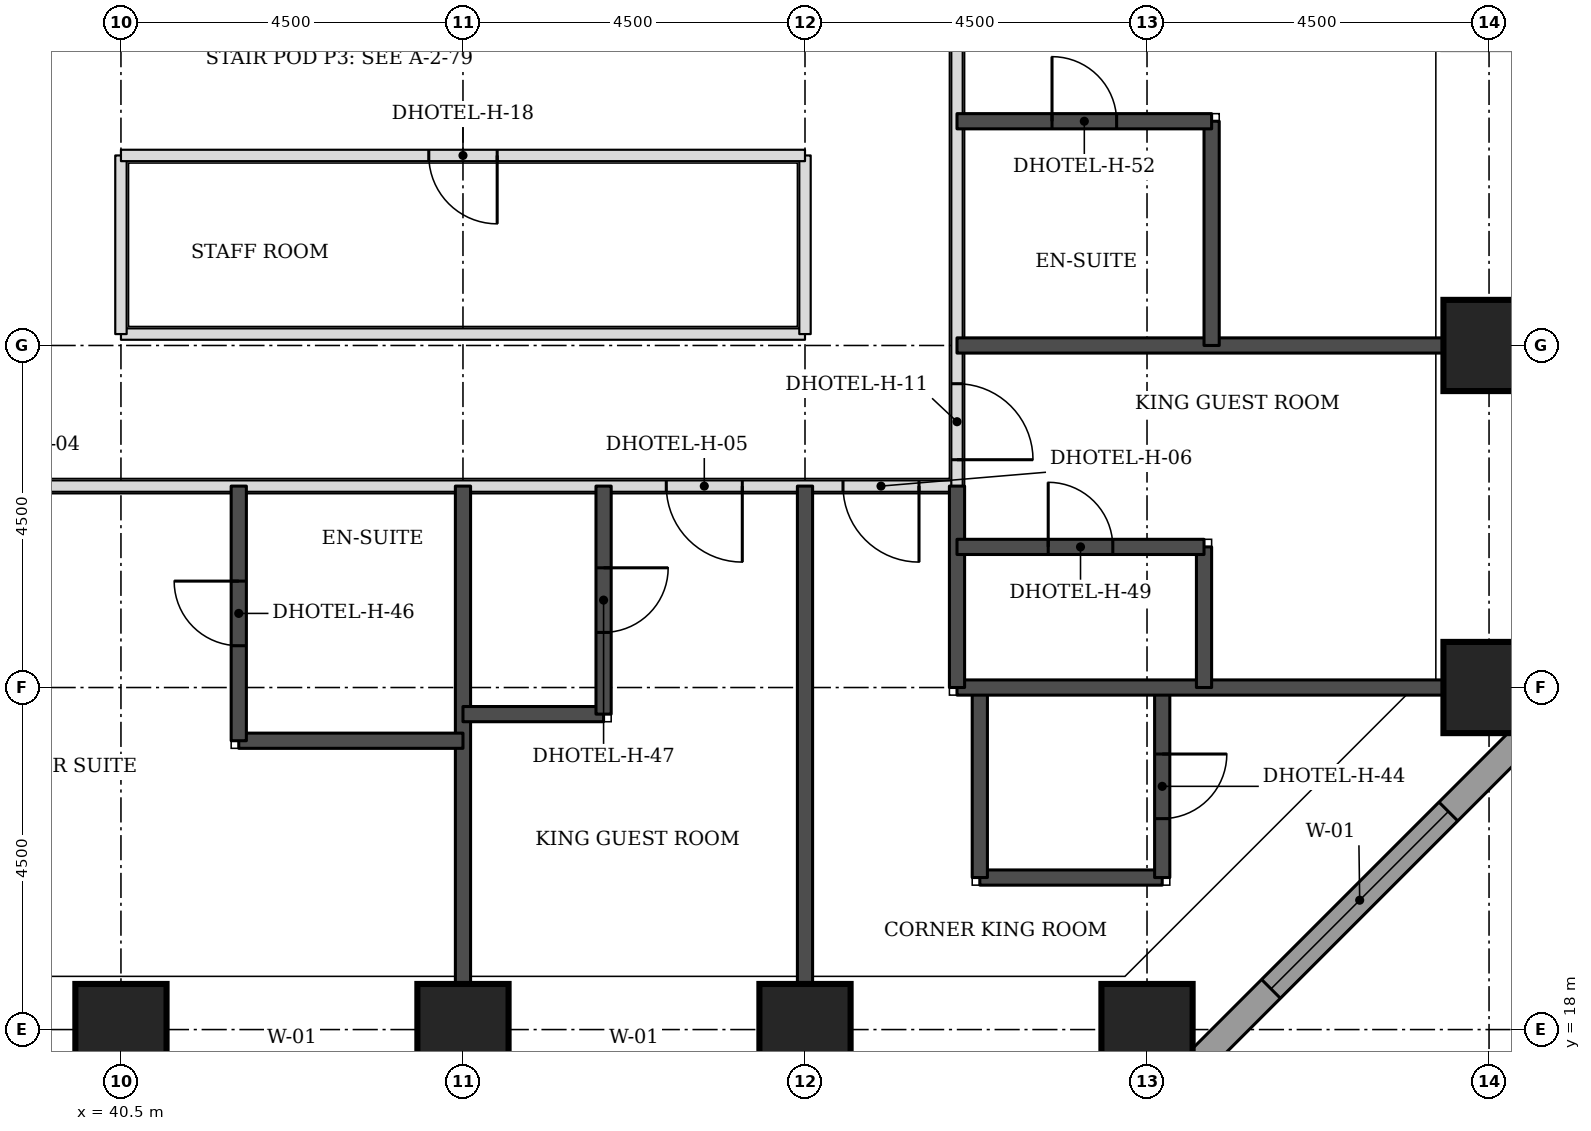
"""IFC4 building model, lengths in metres.
Left out: names, types, materials, properties, quantities, classifications, styles, units other than length and angle.
Written with IfcOpenShell. Run it as: python <this file> out.ifc"""

import sys

from ifc_helpers import new_model, si_unit, direction, frame, frame_2d, origin, origin_2d, place, context, subcontext, project, spatial, rectangle, extrude, element, fill, save


model = new_model("IFC4")
c1 = context("Model", 3, precision=1e-05, world=origin(), true_north=direction((0.0, 1.0)))
c2 = subcontext(c1, "Body", "Model", "MODEL_VIEW")
j1 = project(units=[si_unit("LENGTHUNIT", "METRE"), si_unit("PLANEANGLEUNIT", "RADIAN")], contexts=[c1])
p1 = place(None, origin())
s1 = spatial("IfcSite", under=j1, at=p1, CompositionType="ELEMENT")
p2 = place(p1, origin())
s2 = spatial("IfcBuilding", under=s1, at=p2, CompositionType="ELEMENT")
p3 = place(p2, frame((0.0, 0.0, 46.2)))
s3 = spatial("IfcBuildingStorey", under=s2, at=p3, CompositionType="ELEMENT", Elevation=46.2)
for number, where, z_axis, x_axis in (
    (1, (40.5, 18.0, 0.0), (0.0, 0.0, 1.0), (1.0, 0.0, 0.0)),
    (2, (45.0, 18.0, 0.0), (0.0, 0.0, 1.0), (1.0, 0.0, 0.0)),
    (3, (49.5, 18.0, 0.0), (0.0, 0.0, 1.0), (1.0, 0.0, 0.0)),
    (4, (54.0, 18.0, 0.0), (0.0, 0.0, 1.0), (1.0, 0.0, 0.0)),
    (5, (58.5, 22.5, 0.0), (0.0, 0.0, 1.0), (1.0, 0.0, 0.0)),
    (6, (58.5, 27.0, 0.0), (0.0, 0.0, 1.0), (1.0, 0.0, 0.0)),
):
    element("IfcColumn", number, at=place(p3, frame(where, z_axis=z_axis, x_axis=x_axis)), inside=s3, PredefinedType="COLUMN", context=c2, shape_type="SweptSolid", body=[
        extrude(rectangle(XDim=1.2, YDim=1.2, at=origin_2d()), origin(), (0.0, 0.0, 1.0), 3.3),
    ])
p4 = place(p3, frame((54.27, 17.174, 0.0), z_axis=(0.0, 0.0, 1.0), x_axis=(0.707106781187, 0.707106781187, 0.0)))
e7 = element("IfcWall", 7, at=p4, inside=s3, PredefinedType="STANDARD", context=c2, shape_type="SweptSolid", body=[
    extrude(rectangle(XDim=7.151, YDim=0.35, at=frame_2d((3.576, 0.0))), origin(), (0.0, 0.0, 1.0), 3.055),
])
p5 = place(p4, frame((1.926, 0.0, 0.8)))
e8 = element("IfcOpeningElement", 8, at=p5, cuts=e7, PredefinedType="OPENING", context=c2, shape_type="SweptSolid", body=[
    extrude(rectangle(XDim=3.3, YDim=1.5, at=frame_2d((1.65, 0.75))), frame((0.0, 0.185, 0.0), z_axis=(0.0, -1.0, 0.0), x_axis=(1.0, 0.0, 0.0)), (0.0, 0.0, 1.0), 0.37),
])
p6 = place(p3, frame((20.65, 25.15, 0.0), z_axis=(0.0, 0.0, 1.0), x_axis=(1.0, 0.0, 0.0)))
e9 = element("IfcWall", 9, at=p6, inside=s3, PredefinedType="PARTITIONING", context=c2, shape_type="SweptSolid", body=[
    extrude(rectangle(XDim=30.85, YDim=0.15, at=frame_2d((15.425, 0.0))), origin(), (0.0, 0.0, 1.0), 3.08),
])
p7 = place(p6, frame((2.425, 0.0, 0.0)))
e10 = element("IfcOpeningElement", 10, at=p7, cuts=e9, PredefinedType="OPENING", context=c2, shape_type="SweptSolid", body=[
    extrude(rectangle(XDim=1.0, YDim=2.1, at=frame_2d((0.5, 1.05))), frame((0.0, 0.085, 0.0), z_axis=(0.0, -1.0, 0.0), x_axis=(1.0, 0.0, 0.0)), (0.0, 0.0, 1.0), 0.17),
])
p8 = place(p6, frame((11.575, 0.0, 0.0)))
e11 = element("IfcOpeningElement", 11, at=p8, cuts=e9, PredefinedType="OPENING", context=c2, shape_type="SweptSolid", body=[
    extrude(rectangle(XDim=1.0, YDim=2.1, at=frame_2d((0.5, 1.05))), frame((0.0, 0.085, 0.0), z_axis=(0.0, -1.0, 0.0), x_axis=(1.0, 0.0, 0.0)), (0.0, 0.0, 1.0), 0.17),
])
p9 = place(p6, frame((17.875, 0.0, 0.0)))
e12 = element("IfcOpeningElement", 12, at=p9, cuts=e9, PredefinedType="OPENING", context=c2, shape_type="SweptSolid", body=[
    extrude(rectangle(XDim=1.0, YDim=2.1, at=frame_2d((0.5, 1.05))), frame((0.0, 0.085, 0.0), z_axis=(0.0, -1.0, 0.0), x_axis=(1.0, 0.0, 0.0)), (0.0, 0.0, 1.0), 0.17),
])
p10 = place(p6, frame((27.025, 0.0, 0.0)))
e13 = element("IfcOpeningElement", 13, at=p10, cuts=e9, PredefinedType="OPENING", context=c2, shape_type="SweptSolid", body=[
    extrude(rectangle(XDim=1.0, YDim=2.1, at=frame_2d((0.5, 1.05))), frame((0.0, 0.085, 0.0), z_axis=(0.0, -1.0, 0.0), x_axis=(1.0, 0.0, 0.0)), (0.0, 0.0, 1.0), 0.17),
])
p11 = place(p6, frame((0.425, 0.0, 0.0)))
e14 = element("IfcOpeningElement", 14, at=p11, cuts=e9, PredefinedType="OPENING", context=c2, shape_type="SweptSolid", body=[
    extrude(rectangle(XDim=1.0, YDim=2.1, at=frame_2d((0.5, 1.05))), frame((0.0, 0.085, 0.0), z_axis=(0.0, -1.0, 0.0), x_axis=(1.0, 0.0, 0.0)), (0.0, 0.0, 1.0), 0.17),
])
p12 = place(p6, frame((29.35, 0.0, 0.0)))
e15 = element("IfcOpeningElement", 15, at=p12, cuts=e9, PredefinedType="OPENING", context=c2, shape_type="SweptSolid", body=[
    extrude(rectangle(XDim=1.0, YDim=2.1, at=frame_2d((0.5, 1.05))), frame((0.0, 0.085, 0.0), z_axis=(0.0, -1.0, 0.0), x_axis=(1.0, 0.0, 0.0)), (0.0, 0.0, 1.0), 0.17),
])
p13 = place(p3, frame((51.5, 25.15, 0.0), z_axis=(0.0, 0.0, 1.0), x_axis=(0.0, 1.0, 0.0)))
e16 = element("IfcWall", 16, at=p13, inside=s3, PredefinedType="PARTITIONING", context=c2, shape_type="SweptSolid", body=[
    extrude(rectangle(XDim=22.35, YDim=0.15, at=frame_2d((11.175, 0.0))), origin(), (0.0, 0.0, 1.0), 3.08),
])
p14 = place(p13, frame((0.347, 0.0, 0.0)))
e17 = element("IfcOpeningElement", 17, at=p14, cuts=e16, PredefinedType="OPENING", context=c2, shape_type="SweptSolid", body=[
    extrude(rectangle(XDim=1.0, YDim=2.1, at=frame_2d((0.5, 1.05))), frame((0.0, 0.085, 0.0), z_axis=(0.0, -1.0, 0.0), x_axis=(1.0, 0.0, 0.0)), (0.0, 0.0, 1.0), 0.17),
])
p15 = place(p13, frame((7.325, 0.0, 0.0)))
e18 = element("IfcOpeningElement", 18, at=p15, cuts=e16, PredefinedType="OPENING", context=c2, shape_type="SweptSolid", body=[
    extrude(rectangle(XDim=1.0, YDim=2.1, at=frame_2d((0.5, 1.05))), frame((0.0, 0.085, 0.0), z_axis=(0.0, -1.0, 0.0), x_axis=(1.0, 0.0, 0.0)), (0.0, 0.0, 1.0), 0.17),
])
p16 = place(p13, frame((11.675, 0.0, 0.0)))
e19 = element("IfcOpeningElement", 19, at=p16, cuts=e16, PredefinedType="OPENING", context=c2, shape_type="SweptSolid", body=[
    extrude(rectangle(XDim=1.0, YDim=2.1, at=frame_2d((0.5, 1.05))), frame((0.0, 0.085, 0.0), z_axis=(0.0, -1.0, 0.0), x_axis=(1.0, 0.0, 0.0)), (0.0, 0.0, 1.0), 0.17),
])
p17 = place(p3, frame((40.5, 27.15, 0.0), z_axis=(0.0, 0.0, 1.0), x_axis=(1.0, 0.0, 0.0)))
e20 = element("IfcWall", 20, at=p17, inside=s3, PredefinedType="PARTITIONING", context=c2, shape_type="SweptSolid", body=[
    extrude(rectangle(XDim=9.0, YDim=0.15, at=frame_2d((4.5, 0.0))), origin(), (0.0, 0.0, 1.0), 3.08),
])
for number, where, z_axis, x_axis in (
    (21, (40.5, 27.15, 0.0), (0.0, 0.0, 1.0), (0.0, 1.0, 0.0)),
    (22, (49.5, 27.15, 0.0), (0.0, 0.0, 1.0), (0.0, 1.0, 0.0)),
):
    element("IfcWall", number, at=place(p3, frame(where, z_axis=z_axis, x_axis=x_axis)), inside=s3, PredefinedType="PARTITIONING", context=c2, shape_type="SweptSolid", body=[
        extrude(rectangle(XDim=2.35, YDim=0.15, at=frame_2d((1.175, 0.0))), origin(), (0.0, 0.0, 1.0), 3.08),
    ])
p18 = place(p3, frame((40.5, 29.5, 0.0), z_axis=(0.0, 0.0, 1.0), x_axis=(1.0, 0.0, 0.0)))
e23 = element("IfcWall", 23, at=p18, inside=s3, PredefinedType="PARTITIONING", context=c2, shape_type="SweptSolid", body=[
    extrude(rectangle(XDim=9.0, YDim=0.15, at=frame_2d((4.5, 0.0))), origin(), (0.0, 0.0, 1.0), 3.08),
])
p19 = place(p18, frame((4.05, 0.0, 0.0)))
e24 = element("IfcOpeningElement", 24, at=p19, cuts=e23, PredefinedType="OPENING", context=c2, shape_type="SweptSolid", body=[
    extrude(rectangle(XDim=0.9, YDim=2.1, at=frame_2d((0.45, 1.05))), frame((0.0, 0.085, 0.0), z_axis=(0.0, -1.0, 0.0), x_axis=(1.0, 0.0, 0.0)), (0.0, 0.0, 1.0), 0.17),
])
for number, where, z_axis, x_axis in (
    (25, (45.0, 18.6, 0.0), (0.0, 0.0, 1.0), (0.0, 1.0, 0.0)),
    (26, (49.5, 18.6, 0.0), (0.0, 0.0, 1.0), (0.0, 1.0, 0.0)),
):
    element("IfcWall", number, at=place(p3, frame(where, z_axis=z_axis, x_axis=x_axis)), inside=s3, PredefinedType="SOLIDWALL", context=c2, shape_type="SweptSolid", body=[
        extrude(rectangle(XDim=6.55, YDim=0.2, at=frame_2d((3.275, 0.0))), origin(), (0.0, 0.0, 1.0), 3.08),
    ])
p20 = place(p3, frame((51.8, 20.0, 0.0), z_axis=(0.0, 0.0, 1.0), x_axis=(1.0, 0.0, 0.0)))
e27 = element("IfcWall", 27, at=p20, inside=s3, PredefinedType="SOLIDWALL", context=c2, shape_type="SweptSolid", body=[
    extrude(rectangle(XDim=2.4, YDim=0.2, at=frame_2d((1.2, 0.0))), origin(), (0.0, 0.0, 1.0), 3.08),
])
p21 = place(p3, frame((51.8, 20.0, 0.0), z_axis=(0.0, 0.0, 1.0), x_axis=(0.0, 1.0, 0.0)))
e28 = element("IfcWall", 28, at=p21, inside=s3, PredefinedType="SOLIDWALL", context=c2, shape_type="SweptSolid", body=[
    extrude(rectangle(XDim=2.5, YDim=0.2, at=frame_2d((1.25, 0.0))), origin(), (0.0, 0.0, 1.0), 3.08),
])
p22 = place(p3, frame((54.2, 20.0, 0.0), z_axis=(0.0, 0.0, 1.0), x_axis=(0.0, 1.0, 0.0)))
e29 = element("IfcWall", 29, at=p22, inside=s3, PredefinedType="SOLIDWALL", context=c2, shape_type="SweptSolid", body=[
    extrude(rectangle(XDim=2.5, YDim=0.2, at=frame_2d((1.25, 0.0))), origin(), (0.0, 0.0, 1.0), 3.08),
])
p23 = place(p22, frame((0.775, 0.0, 0.0)))
e30 = element("IfcOpeningElement", 30, at=p23, cuts=e29, PredefinedType="OPENING", context=c2, shape_type="SweptSolid", body=[
    extrude(rectangle(XDim=0.85, YDim=2.1, at=frame_2d((0.425, 1.05))), frame((0.0, 0.11, 0.0), z_axis=(0.0, -1.0, 0.0), x_axis=(1.0, 0.0, 0.0)), (0.0, 0.0, 1.0), 0.22),
])
p24 = place(p3, frame((42.05, 21.8, 0.0), z_axis=(0.0, 0.0, 1.0), x_axis=(1.0, 0.0, 0.0)))
e31 = element("IfcWall", 31, at=p24, inside=s3, PredefinedType="SOLIDWALL", context=c2, shape_type="SweptSolid", body=[
    extrude(rectangle(XDim=2.95, YDim=0.2, at=frame_2d((1.475, 0.0))), origin(), (0.0, 0.0, 1.0), 3.08),
])
p25 = place(p3, frame((42.05, 21.8, 0.0), z_axis=(0.0, 0.0, 1.0), x_axis=(0.0, 1.0, 0.0)))
e32 = element("IfcWall", 32, at=p25, inside=s3, PredefinedType="SOLIDWALL", context=c2, shape_type="SweptSolid", body=[
    extrude(rectangle(XDim=3.35, YDim=0.2, at=frame_2d((1.675, 0.0))), origin(), (0.0, 0.0, 1.0), 3.08),
])
p26 = place(p25, frame((1.25, 0.0, 0.0)))
e33 = element("IfcOpeningElement", 33, at=p26, cuts=e32, PredefinedType="OPENING", context=c2, shape_type="SweptSolid", body=[
    extrude(rectangle(XDim=0.85, YDim=2.1, at=frame_2d((0.425, 1.05))), frame((0.0, 0.11, 0.0), z_axis=(0.0, -1.0, 0.0), x_axis=(1.0, 0.0, 0.0)), (0.0, 0.0, 1.0), 0.22),
])
p27 = place(p3, frame((45.0, 22.15, 0.0), z_axis=(0.0, 0.0, 1.0), x_axis=(1.0, 0.0, 0.0)))
e34 = element("IfcWall", 34, at=p27, inside=s3, PredefinedType="SOLIDWALL", context=c2, shape_type="SweptSolid", body=[
    extrude(rectangle(XDim=1.85, YDim=0.2, at=frame_2d((0.925, 0.0))), origin(), (0.0, 0.0, 1.0), 3.08),
])
p28 = place(p3, frame((46.85, 22.15, 0.0), z_axis=(0.0, 0.0, 1.0), x_axis=(0.0, 1.0, 0.0)))
e35 = element("IfcWall", 35, at=p28, inside=s3, PredefinedType="SOLIDWALL", context=c2, shape_type="SweptSolid", body=[
    extrude(rectangle(XDim=3.0, YDim=0.2, at=frame_2d((1.5, 0.0))), origin(), (0.0, 0.0, 1.0), 3.08),
])
p29 = place(p28, frame((1.075, 0.0, 0.0)))
e36 = element("IfcOpeningElement", 36, at=p29, cuts=e35, PredefinedType="OPENING", context=c2, shape_type="SweptSolid", body=[
    extrude(rectangle(XDim=0.85, YDim=2.1, at=frame_2d((0.425, 1.05))), frame((0.0, 0.11, 0.0), z_axis=(0.0, -1.0, 0.0), x_axis=(1.0, 0.0, 0.0)), (0.0, 0.0, 1.0), 0.22),
])
p30 = place(p3, frame((51.5, 22.5, 0.0), z_axis=(0.0, 0.0, 1.0), x_axis=(1.0, 0.0, 0.0)))
e37 = element("IfcWall", 37, at=p30, inside=s3, PredefinedType="SOLIDWALL", context=c2, shape_type="SweptSolid", body=[
    extrude(rectangle(XDim=6.4, YDim=0.2, at=frame_2d((3.2, 0.0))), origin(), (0.0, 0.0, 1.0), 3.08),
])
p31 = place(p3, frame((51.5, 22.5, 0.0), z_axis=(0.0, 0.0, 1.0), x_axis=(0.0, 1.0, 0.0)))
e38 = element("IfcWall", 38, at=p31, inside=s3, PredefinedType="SOLIDWALL", context=c2, shape_type="SweptSolid", body=[
    extrude(rectangle(XDim=2.65, YDim=0.2, at=frame_2d((1.325, 0.0))), origin(), (0.0, 0.0, 1.0), 3.08),
])
p32 = place(p3, frame((54.75, 22.5, 0.0), z_axis=(0.0, 0.0, 1.0), x_axis=(0.0, 1.0, 0.0)))
e39 = element("IfcWall", 39, at=p32, inside=s3, PredefinedType="SOLIDWALL", context=c2, shape_type="SweptSolid", body=[
    extrude(rectangle(XDim=1.85, YDim=0.2, at=frame_2d((0.925, 0.0))), origin(), (0.0, 0.0, 1.0), 3.08),
])
p33 = place(p3, frame((51.5, 24.35, 0.0), z_axis=(0.0, 0.0, 1.0), x_axis=(1.0, 0.0, 0.0)))
e40 = element("IfcWall", 40, at=p33, inside=s3, PredefinedType="SOLIDWALL", context=c2, shape_type="SweptSolid", body=[
    extrude(rectangle(XDim=3.25, YDim=0.2, at=frame_2d((1.625, 0.0))), origin(), (0.0, 0.0, 1.0), 3.08),
])
p34 = place(p33, frame((1.2, 0.0, 0.0)))
e41 = element("IfcOpeningElement", 41, at=p34, cuts=e40, PredefinedType="OPENING", context=c2, shape_type="SweptSolid", body=[
    extrude(rectangle(XDim=0.85, YDim=2.1, at=frame_2d((0.425, 1.05))), frame((0.0, 0.11, 0.0), z_axis=(0.0, -1.0, 0.0), x_axis=(1.0, 0.0, 0.0)), (0.0, 0.0, 1.0), 0.22),
])
p35 = place(p3, frame((51.5, 27.0, 0.0), z_axis=(0.0, 0.0, 1.0), x_axis=(1.0, 0.0, 0.0)))
e42 = element("IfcWall", 42, at=p35, inside=s3, PredefinedType="SOLIDWALL", context=c2, shape_type="SweptSolid", body=[
    extrude(rectangle(XDim=6.4, YDim=0.2, at=frame_2d((3.2, 0.0))), origin(), (0.0, 0.0, 1.0), 3.08),
])
p36 = place(p3, frame((54.85, 27.0, 0.0), z_axis=(0.0, 0.0, 1.0), x_axis=(0.0, 1.0, 0.0)))
e43 = element("IfcWall", 43, at=p36, inside=s3, PredefinedType="SOLIDWALL", context=c2, shape_type="SweptSolid", body=[
    extrude(rectangle(XDim=2.95, YDim=0.2, at=frame_2d((1.475, 0.0))), origin(), (0.0, 0.0, 1.0), 3.08),
])
p37 = place(p3, frame((51.5, 29.95, 0.0), z_axis=(0.0, 0.0, 1.0), x_axis=(1.0, 0.0, 0.0)))
e44 = element("IfcWall", 44, at=p37, inside=s3, PredefinedType="SOLIDWALL", context=c2, shape_type="SweptSolid", body=[
    extrude(rectangle(XDim=3.35, YDim=0.2, at=frame_2d((1.675, 0.0))), origin(), (0.0, 0.0, 1.0), 3.08),
])
p38 = place(p37, frame((1.25, 0.0, 0.0)))
e45 = element("IfcOpeningElement", 45, at=p38, cuts=e44, PredefinedType="OPENING", context=c2, shape_type="SweptSolid", body=[
    extrude(rectangle(XDim=0.85, YDim=2.1, at=frame_2d((0.425, 1.05))), frame((0.0, 0.11, 0.0), z_axis=(0.0, -1.0, 0.0), x_axis=(1.0, 0.0, 0.0)), (0.0, 0.0, 1.0), 0.22),
])
p39 = place(p5, origin())
e46 = element("IfcWindow", 46, at=p39, inside=s3, PartitioningType="SINGLE_PANEL", PredefinedType="WINDOW", context=c2, shape_type="SweptSolid", body=[
    extrude(rectangle(XDim=3.3, YDim=1.5, at=frame_2d((1.65, 0.75))), frame((0.0, 0.085, 0.0), z_axis=(0.0, -1.0, 0.0), x_axis=(1.0, 0.0, 0.0)), (0.0, 0.0, 1.0), 0.06),
])
fill(e8, e46)
p40 = place(p26, origin())
e47 = element("IfcDoor", 47, at=p40, inside=s3, OperationType="SINGLE_SWING_RIGHT", PredefinedType="DOOR", context=c2, shape_type="SweptSolid", body=[
    extrude(rectangle(XDim=0.85, YDim=2.1, at=frame_2d((0.425, 1.05))), frame((0.0, 0.025, 0.0), z_axis=(0.0, -1.0, 0.0), x_axis=(1.0, 0.0, 0.0)), (0.0, 0.0, 1.0), 0.05),
])
fill(e33, e47)
p41 = place(p10, frame((1.0, 0.0, 0.0), z_axis=(0.0, 0.0, 1.0), x_axis=(-1.0, 0.0, 0.0)))
e48 = element("IfcDoor", 48, at=p41, inside=s3, OperationType="SINGLE_SWING_LEFT", PredefinedType="DOOR", context=c2, shape_type="SweptSolid", body=[
    extrude(rectangle(XDim=1.0, YDim=2.1, at=frame_2d((0.5, 1.05))), frame((0.0, 0.025, 0.0), z_axis=(0.0, -1.0, 0.0), x_axis=(1.0, 0.0, 0.0)), (0.0, 0.0, 1.0), 0.05),
])
fill(e13, e48)
p42 = place(p29, frame((0.85, 0.0, 0.0), z_axis=(0.0, 0.0, 1.0), x_axis=(-1.0, 0.0, 0.0)))
e49 = element("IfcDoor", 49, at=p42, inside=s3, OperationType="SINGLE_SWING_LEFT", PredefinedType="DOOR", context=c2, shape_type="SweptSolid", body=[
    extrude(rectangle(XDim=0.85, YDim=2.1, at=frame_2d((0.425, 1.05))), frame((0.0, 0.025, 0.0), z_axis=(0.0, -1.0, 0.0), x_axis=(1.0, 0.0, 0.0)), (0.0, 0.0, 1.0), 0.05),
])
fill(e36, e49)
p43 = place(p14, frame((1.0, 0.0, 0.0), z_axis=(0.0, 0.0, 1.0), x_axis=(-1.0, 0.0, 0.0)))
e50 = element("IfcDoor", 50, at=p43, inside=s3, OperationType="SINGLE_SWING_RIGHT", PredefinedType="DOOR", context=c2, shape_type="SweptSolid", body=[
    extrude(rectangle(XDim=1.0, YDim=2.1, at=frame_2d((0.5, 1.05))), frame((0.0, 0.025, 0.0), z_axis=(0.0, -1.0, 0.0), x_axis=(1.0, 0.0, 0.0)), (0.0, 0.0, 1.0), 0.05),
])
fill(e17, e50)
p44 = place(p34, origin())
e51 = element("IfcDoor", 51, at=p44, inside=s3, OperationType="SINGLE_SWING_LEFT", PredefinedType="DOOR", context=c2, shape_type="SweptSolid", body=[
    extrude(rectangle(XDim=0.85, YDim=2.1, at=frame_2d((0.425, 1.05))), frame((0.0, 0.025, 0.0), z_axis=(0.0, -1.0, 0.0), x_axis=(1.0, 0.0, 0.0)), (0.0, 0.0, 1.0), 0.05),
])
fill(e41, e51)
p45 = place(p38, origin())
e52 = element("IfcDoor", 52, at=p45, inside=s3, OperationType="SINGLE_SWING_LEFT", PredefinedType="DOOR", context=c2, shape_type="SweptSolid", body=[
    extrude(rectangle(XDim=0.85, YDim=2.1, at=frame_2d((0.425, 1.05))), frame((0.0, 0.025, 0.0), z_axis=(0.0, -1.0, 0.0), x_axis=(1.0, 0.0, 0.0)), (0.0, 0.0, 1.0), 0.05),
])
fill(e45, e52)
p46 = place(p12, frame((1.0, 0.0, 0.0), z_axis=(0.0, 0.0, 1.0), x_axis=(-1.0, 0.0, 0.0)))
e53 = element("IfcDoor", 53, at=p46, inside=s3, OperationType="SINGLE_SWING_LEFT", PredefinedType="DOOR", context=c2, shape_type="SweptSolid", body=[
    extrude(rectangle(XDim=1.0, YDim=2.1, at=frame_2d((0.5, 1.05))), frame((0.0, 0.025, 0.0), z_axis=(0.0, -1.0, 0.0), x_axis=(1.0, 0.0, 0.0)), (0.0, 0.0, 1.0), 0.05),
])
fill(e15, e53)
p47 = place(p23, frame((0.85, 0.0, 0.0), z_axis=(0.0, 0.0, 1.0), x_axis=(-1.0, 0.0, 0.0)))
e54 = element("IfcDoor", 54, at=p47, inside=s3, OperationType="SINGLE_SWING_LEFT", PredefinedType="DOOR", context=c2, shape_type="SweptSolid", body=[
    extrude(rectangle(XDim=0.85, YDim=2.1, at=frame_2d((0.425, 1.05))), frame((0.0, 0.025, 0.0), z_axis=(0.0, -1.0, 0.0), x_axis=(1.0, 0.0, 0.0)), (0.0, 0.0, 1.0), 0.05),
])
fill(e30, e54)
p48 = place(p19, frame((0.9, 0.0, 0.0), z_axis=(0.0, 0.0, 1.0), x_axis=(-1.0, 0.0, 0.0)))
e55 = element("IfcDoor", 55, at=p48, inside=s3, OperationType="SINGLE_SWING_LEFT", PredefinedType="DOOR", context=c2, shape_type="SweptSolid", body=[
    extrude(rectangle(XDim=0.9, YDim=2.1, at=frame_2d((0.45, 1.05))), frame((0.0, 0.025, 0.0), z_axis=(0.0, -1.0, 0.0), x_axis=(1.0, 0.0, 0.0)), (0.0, 0.0, 1.0), 0.05),
])
fill(e24, e55)
save(model, sys.argv[1])
